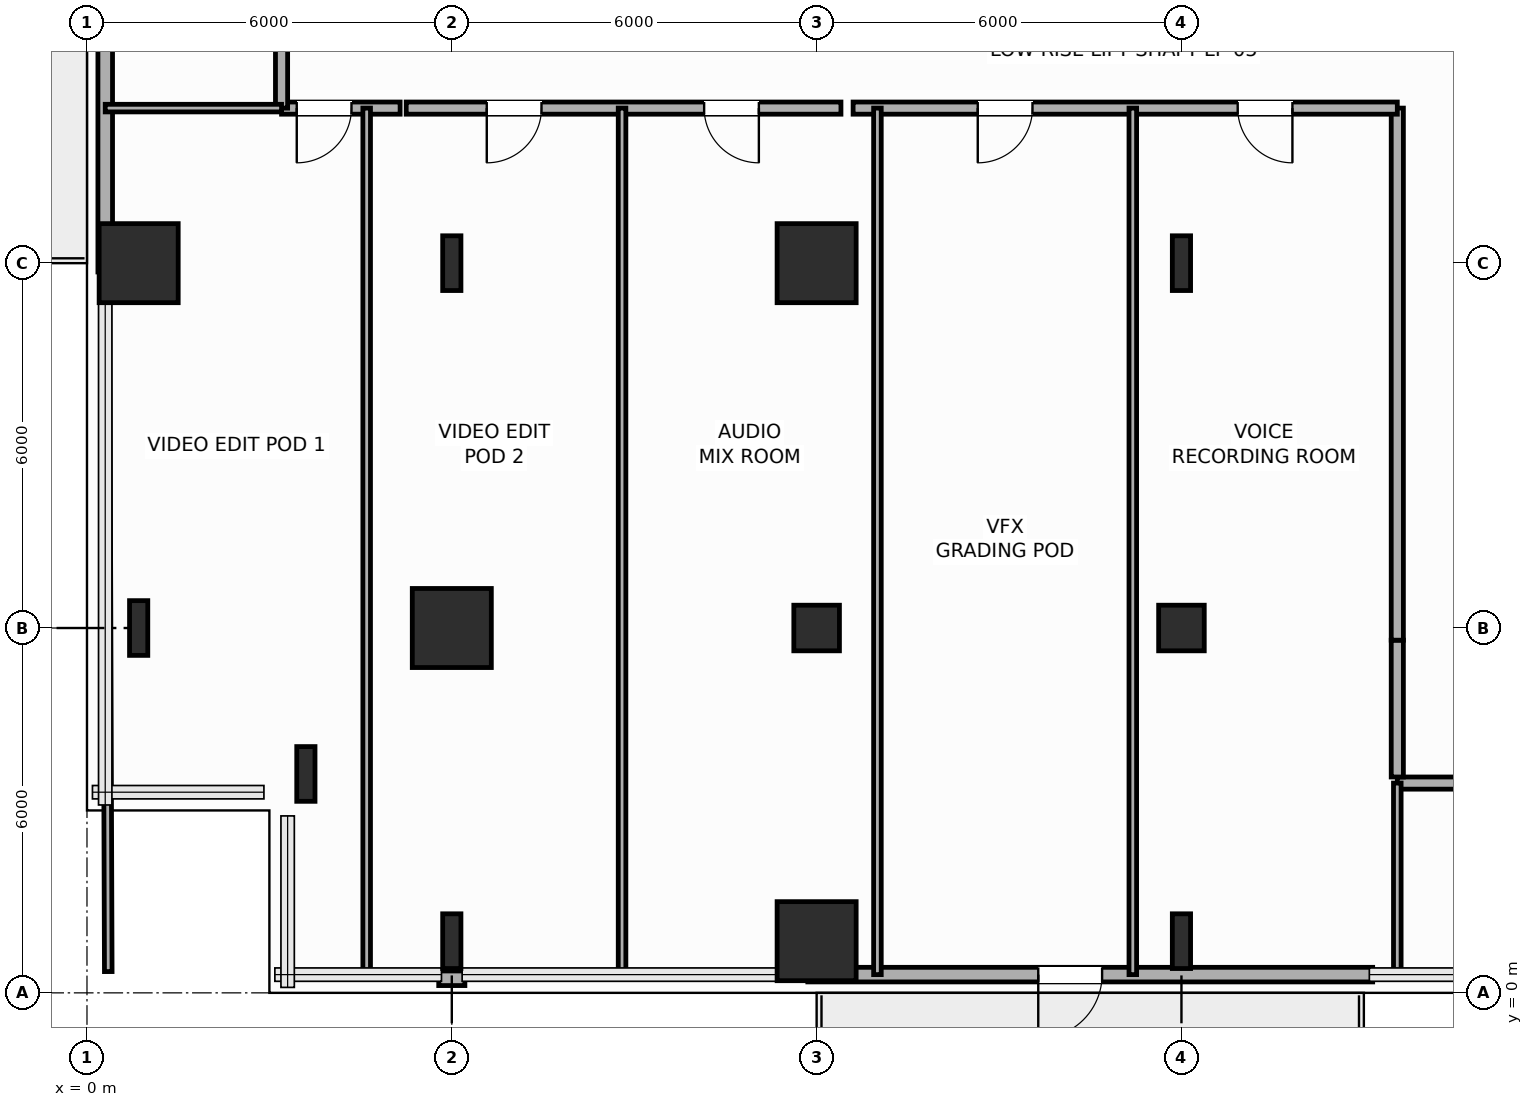
"""IFC4 building model, lengths in metres.
Left out: names, types, materials, properties, quantities, classifications, styles, units other than length and angle.
Written with IfcOpenShell. Run it as: python <this file> out.ifc"""

import sys

from ifc_helpers import new_model, si_unit, direction, frame, frame_2d, origin, origin_2d, place, context, subcontext, project, spatial, rectangle, hollow_rectangle, i_section, extrude, element, fill, save


model = new_model("IFC4")
c1 = context("Model", 3, precision=1e-05, world=origin(), true_north=direction((0.0, 1.0)))
c2 = subcontext(c1, "Body", "Model", "MODEL_VIEW")
j1 = project(units=[si_unit("LENGTHUNIT", "METRE"), si_unit("PLANEANGLEUNIT", "RADIAN")], contexts=[c1])
p1 = place(None, origin())
s1 = spatial("IfcSite", under=j1, at=p1, CompositionType="ELEMENT")
p2 = place(p1, origin())
s2 = spatial("IfcBuilding", under=s1, at=p2, CompositionType="ELEMENT")
p3 = place(p2, frame((0.0, 0.0, 48.0)))
s3 = spatial("IfcBuildingStorey", under=s2, at=p3, CompositionType="ELEMENT", Elevation=48.0)
for number, where, z_axis, x_axis in (
    (1, (3.6, 3.6, 0.0), (0.0, 0.0, 1.0), (1.0, 0.0, 0.0)),
    (2, (0.85, 6.0, 0.0), (0.0, 0.0, 1.0), (1.0, 0.0, 0.0)),
):
    element("IfcColumn", number, at=place(p3, frame(where, z_axis=z_axis, x_axis=x_axis)), inside=s3, PredefinedType="COLUMN", context=c2, shape_type="SweptSolid", body=[
        extrude(i_section(OverallWidth=0.3, OverallDepth=0.9, WebThickness=0.019, FlangeThickness=0.035, FilletRadius=0.03, at=origin_2d()), origin(), (0.0, 0.0, 1.0), 3.9),
    ])
p4 = place(p3, frame((0.85, 12.0, 0.0), z_axis=(0.0, 0.0, 1.0), x_axis=(1.0, 0.0, 0.0)))
e3 = element("IfcColumn", 3, at=p4, inside=s3, PredefinedType="COLUMN", context=c2, shape_type="SweptSolid", body=[
    extrude(rectangle(XDim=1.3, YDim=1.3, at=origin_2d()), origin(), (0.0, 0.0, 1.0), 3.9),
])
p5 = place(p3, frame((6.0, 0.85, 0.0), z_axis=(0.0, 0.0, 1.0), x_axis=(1.0, 0.0, 0.0)))
e4 = element("IfcColumn", 4, at=p5, inside=s3, PredefinedType="COLUMN", context=c2, shape_type="SweptSolid", body=[
    extrude(i_section(OverallWidth=0.3, OverallDepth=0.9, WebThickness=0.019, FlangeThickness=0.035, FilletRadius=0.03, at=origin_2d()), origin(), (0.0, 0.0, 1.0), 3.9),
])
p6 = place(p3, frame((6.0, 6.0, 0.0), z_axis=(0.0, 0.0, 1.0), x_axis=(1.0, 0.0, 0.0)))
e5 = element("IfcColumn", 5, at=p6, inside=s3, PredefinedType="COLUMN", context=c2, shape_type="SweptSolid", body=[
    extrude(rectangle(XDim=1.3, YDim=1.3, at=origin_2d()), origin(), (0.0, 0.0, 1.0), 3.9),
])
p7 = place(p3, frame((6.0, 12.0, 0.0), z_axis=(0.0, 0.0, 1.0), x_axis=(1.0, 0.0, 0.0)))
e6 = element("IfcColumn", 6, at=p7, inside=s3, PredefinedType="COLUMN", context=c2, shape_type="SweptSolid", body=[
    extrude(i_section(OverallWidth=0.3, OverallDepth=0.9, WebThickness=0.019, FlangeThickness=0.035, FilletRadius=0.03, at=origin_2d()), origin(), (0.0, 0.0, 1.0), 3.9),
])
p8 = place(p3, frame((12.0, 0.85, 0.0), z_axis=(0.0, 0.0, 1.0), x_axis=(1.0, 0.0, 0.0)))
e7 = element("IfcColumn", 7, at=p8, inside=s3, PredefinedType="COLUMN", context=c2, shape_type="SweptSolid", body=[
    extrude(rectangle(XDim=1.3, YDim=1.3, at=origin_2d()), origin(), (0.0, 0.0, 1.0), 3.9),
])
p9 = place(p3, frame((12.0, 6.0, 0.0), z_axis=(0.0, 0.0, 1.0), x_axis=(1.0, 0.0, 0.0)))
e8 = element("IfcColumn", 8, at=p9, inside=s3, PredefinedType="COLUMN", context=c2, shape_type="SweptSolid", body=[
    extrude(hollow_rectangle(XDim=0.75, YDim=0.75, WallThickness=0.035, InnerFilletRadius=0.035, OuterFilletRadius=0.05, at=origin_2d()), origin(), (0.0, 0.0, 1.0), 3.9),
])
p10 = place(p3, frame((12.0, 12.0, 0.0), z_axis=(0.0, 0.0, 1.0), x_axis=(1.0, 0.0, 0.0)))
e9 = element("IfcColumn", 9, at=p10, inside=s3, PredefinedType="COLUMN", context=c2, shape_type="SweptSolid", body=[
    extrude(rectangle(XDim=1.3, YDim=1.3, at=origin_2d()), origin(), (0.0, 0.0, 1.0), 3.9),
])
p11 = place(p3, frame((18.0, 0.85, 0.0), z_axis=(0.0, 0.0, 1.0), x_axis=(1.0, 0.0, 0.0)))
e10 = element("IfcColumn", 10, at=p11, inside=s3, PredefinedType="COLUMN", context=c2, shape_type="SweptSolid", body=[
    extrude(i_section(OverallWidth=0.3, OverallDepth=0.9, WebThickness=0.019, FlangeThickness=0.035, FilletRadius=0.03, at=origin_2d()), origin(), (0.0, 0.0, 1.0), 3.9),
])
p12 = place(p3, frame((18.0, 6.0, 0.0), z_axis=(0.0, 0.0, 1.0), x_axis=(1.0, 0.0, 0.0)))
e11 = element("IfcColumn", 11, at=p12, inside=s3, PredefinedType="COLUMN", context=c2, shape_type="SweptSolid", body=[
    extrude(hollow_rectangle(XDim=0.75, YDim=0.75, WallThickness=0.035, InnerFilletRadius=0.035, OuterFilletRadius=0.05, at=origin_2d()), origin(), (0.0, 0.0, 1.0), 3.9),
])
p13 = place(p3, frame((18.0, 12.0, 0.0), z_axis=(0.0, 0.0, 1.0), x_axis=(1.0, 0.0, 0.0)))
e12 = element("IfcColumn", 12, at=p13, inside=s3, PredefinedType="COLUMN", context=c2, shape_type="SweptSolid", body=[
    extrude(i_section(OverallWidth=0.3, OverallDepth=0.9, WebThickness=0.019, FlangeThickness=0.035, FilletRadius=0.03, at=origin_2d()), origin(), (0.0, 0.0, 1.0), 3.9),
])
p14 = place(p3, frame((21.145, 0.3, 0.0), z_axis=(0.0, 0.0, 1.0), x_axis=(-1.0, 0.0, 0.0)))
e13 = element("IfcWall", 13, at=p14, inside=s3, PredefinedType="SOLIDWALL", context=c2, shape_type="SweptSolid", body=[
    extrude(rectangle(XDim=9.29, YDim=0.24, at=frame_2d((4.645, 0.0))), origin(), (0.0, 0.0, 1.0), 3.65),
])
p15 = place(p14, frame((4.45, 0.0, 0.0)))
e14 = element("IfcOpeningElement", 14, at=p15, cuts=e13, PredefinedType="OPENING", context=c2, shape_type="SweptSolid", body=[
    extrude(rectangle(XDim=1.05, YDim=2.2, at=frame_2d((0.525, 1.1))), frame((0.0, 0.13, 0.0), z_axis=(0.0, -1.0, 0.0), x_axis=(1.0, 0.0, 0.0)), (0.0, 0.0, 1.0), 0.26),
])
p16 = place(p3, frame((0.3, 11.855, 0.0), z_axis=(0.0, 0.0, 1.0), x_axis=(0.0, 1.0, 0.0)))
e15 = element("IfcWall", 15, at=p16, inside=s3, PredefinedType="SOLIDWALL", context=c2, shape_type="SweptSolid", body=[
    extrude(rectangle(XDim=9.29, YDim=0.24, at=frame_2d((4.645, 0.0))), origin(), (0.0, 0.0, 1.0), 3.65),
])
p17 = place(p16, frame((3.945, 0.0, 0.0)))
e16 = element("IfcOpeningElement", 16, at=p17, cuts=e15, PredefinedType="OPENING", context=c2, shape_type="SweptSolid", body=[
    extrude(rectangle(XDim=1.05, YDim=2.2, at=frame_2d((0.525, 1.1))), frame((0.0, 0.13, 0.0), z_axis=(0.0, -1.0, 0.0), x_axis=(1.0, 0.0, 0.0)), (0.0, 0.0, 1.0), 0.26),
])
p18 = place(p3, frame((6.215, 0.24, 0.0), z_axis=(0.0, 0.0, 1.0), x_axis=(-1.0, 0.0, 0.0)))
e17 = element("IfcWall", 17, at=p18, inside=s3, PredefinedType="SOLIDWALL", context=c2, shape_type="SweptSolid", body=[
    extrude(rectangle(XDim=0.43, YDim=0.24, at=frame_2d((0.215, 0.0))), origin(), (0.0, 0.0, 1.0), 3.65),
])
p19 = place(p3, frame((36.15, 3.45, 0.0), z_axis=(0.0, 0.0, 1.0), x_axis=(-1.0, 0.0, 0.0)))
e18 = element("IfcWall", 18, at=p19, inside=s3, PredefinedType="PARTITIONING", context=c2, shape_type="SweptSolid", body=[
    extrude(rectangle(XDim=14.6, YDim=0.2, at=frame_2d((7.3, 0.0))), origin(), (0.0, 0.0, 1.0), 3.142),
])
p20 = place(p19, frame((11.325, 0.0, 0.0)))
e19 = element("IfcOpeningElement", 19, at=p20, cuts=e18, PredefinedType="OPENING", context=c2, shape_type="SweptSolid", body=[
    extrude(rectangle(XDim=0.9, YDim=2.1, at=frame_2d((0.45, 1.05))), frame((0.0, 0.11, 0.0), z_axis=(0.0, -1.0, 0.0), x_axis=(1.0, 0.0, 0.0)), (0.0, 0.0, 1.0), 0.22),
])
p21 = place(p19, frame((5.7, 0.0, 0.0)))
e20 = element("IfcOpeningElement", 20, at=p21, cuts=e18, PredefinedType="OPENING", context=c2, shape_type="SweptSolid", body=[
    extrude(rectangle(XDim=0.9, YDim=2.1, at=frame_2d((0.45, 1.05))), frame((0.0, 0.11, 0.0), z_axis=(0.0, -1.0, 0.0), x_axis=(1.0, 0.0, 0.0)), (0.0, 0.0, 1.0), 0.22),
])
p22 = place(p3, frame((21.55, 3.55, 0.0), z_axis=(0.0, 0.0, 1.0), x_axis=(0.0, 1.0, 0.0)))
e21 = element("IfcWall", 21, at=p22, inside=s3, PredefinedType="PARTITIONING", context=c2, shape_type="SweptSolid", body=[
    extrude(rectangle(XDim=2.25, YDim=0.2, at=frame_2d((1.125, 0.0))), origin(), (0.0, 0.0, 1.0), 3.65),
])
p23 = place(p3, frame((21.55, 5.8, 0.0), z_axis=(0.0, 0.0, 1.0), x_axis=(0.0, 1.0, 0.0)))
e22 = element("IfcWall", 22, at=p23, inside=s3, PredefinedType="PARTITIONING", context=c2, shape_type="SweptSolid", body=[
    extrude(rectangle(XDim=8.75, YDim=0.2, at=frame_2d((4.375, 0.0))), origin(), (0.0, 0.0, 1.0), 3.65),
])
p24 = place(p3, frame((21.55, 14.55, 0.0), z_axis=(0.0, 0.0, 1.0), x_axis=(-1.0, 0.0, 0.0)))
e23 = element("IfcWall", 23, at=p24, inside=s3, PredefinedType="PARTITIONING", context=c2, shape_type="SweptSolid", body=[
    extrude(rectangle(XDim=8.95, YDim=0.2, at=frame_2d((4.475, 0.0))), origin(), (0.0, 0.0, 1.0), 3.65),
])
p25 = place(p24, frame((6.0, 0.0, 0.0)))
e24 = element("IfcOpeningElement", 24, at=p25, cuts=e23, PredefinedType="OPENING", context=c2, shape_type="SweptSolid", body=[
    extrude(rectangle(XDim=0.9, YDim=2.1, at=frame_2d((0.45, 1.05))), frame((0.0, 0.11, 0.0), z_axis=(0.0, -1.0, 0.0), x_axis=(1.0, 0.0, 0.0)), (0.0, 0.0, 1.0), 0.22),
])
p26 = place(p24, frame((1.725, 0.0, 0.0)))
e25 = element("IfcOpeningElement", 25, at=p26, cuts=e23, PredefinedType="OPENING", context=c2, shape_type="SweptSolid", body=[
    extrude(rectangle(XDim=0.9, YDim=2.1, at=frame_2d((0.45, 1.05))), frame((0.0, 0.11, 0.0), z_axis=(0.0, -1.0, 0.0), x_axis=(1.0, 0.0, 0.0)), (0.0, 0.0, 1.0), 0.22),
])
p27 = place(p3, frame((12.4, 14.55, 0.0), z_axis=(0.0, 0.0, 1.0), x_axis=(-1.0, 0.0, 0.0)))
e26 = element("IfcWall", 26, at=p27, inside=s3, PredefinedType="PARTITIONING", context=c2, shape_type="SweptSolid", body=[
    extrude(rectangle(XDim=7.15, YDim=0.2, at=frame_2d((3.575, 0.0))), origin(), (0.0, 0.0, 1.0), 3.65),
])
p28 = place(p27, frame((4.925, 0.0, 0.0)))
e27 = element("IfcOpeningElement", 27, at=p28, cuts=e26, PredefinedType="OPENING", context=c2, shape_type="SweptSolid", body=[
    extrude(rectangle(XDim=0.9, YDim=2.1, at=frame_2d((0.45, 1.05))), frame((0.0, 0.11, 0.0), z_axis=(0.0, -1.0, 0.0), x_axis=(1.0, 0.0, 0.0)), (0.0, 0.0, 1.0), 0.22),
])
p29 = place(p27, frame((1.35, 0.0, 0.0)))
e28 = element("IfcOpeningElement", 28, at=p29, cuts=e26, PredefinedType="OPENING", context=c2, shape_type="SweptSolid", body=[
    extrude(rectangle(XDim=0.9, YDim=2.1, at=frame_2d((0.45, 1.05))), frame((0.0, 0.11, 0.0), z_axis=(0.0, -1.0, 0.0), x_axis=(1.0, 0.0, 0.0)), (0.0, 0.0, 1.0), 0.22),
])
p30 = place(p3, frame((5.15, 14.55, 0.0), z_axis=(0.0, 0.0, 1.0), x_axis=(-1.0, 0.0, 0.0)))
e29 = element("IfcWall", 29, at=p30, inside=s3, PredefinedType="PARTITIONING", context=c2, shape_type="SweptSolid", body=[
    extrude(rectangle(XDim=1.95, YDim=0.2, at=frame_2d((0.975, 0.0))), origin(), (0.0, 0.0, 1.0), 3.65),
])
p31 = place(p30, frame((0.8, 0.0, 0.0)))
e30 = element("IfcOpeningElement", 30, at=p31, cuts=e29, PredefinedType="OPENING", context=c2, shape_type="SweptSolid", body=[
    extrude(rectangle(XDim=0.9, YDim=2.1, at=frame_2d((0.45, 1.05))), frame((0.0, 0.11, 0.0), z_axis=(0.0, -1.0, 0.0), x_axis=(1.0, 0.0, 0.0)), (0.0, 0.0, 1.0), 0.22),
])
p32 = place(p3, frame((3.2, 14.55, 0.0), z_axis=(0.0, 0.0, 1.0), x_axis=(0.0, 1.0, 0.0)))
e31 = element("IfcWall", 31, at=p32, inside=s3, PredefinedType="PARTITIONING", context=c2, shape_type="SweptSolid", body=[
    extrude(rectangle(XDim=15.7, YDim=0.2, at=frame_2d((7.85, 0.0))), origin(), (0.0, 0.0, 1.0), 3.65),
])
p33 = place(p32, frame((2.65, 0.0, 0.0)))
e32 = element("IfcOpeningElement", 32, at=p33, cuts=e31, PredefinedType="OPENING", context=c2, shape_type="SweptSolid", body=[
    extrude(rectangle(XDim=0.9, YDim=2.1, at=frame_2d((0.45, 1.05))), frame((0.0, 0.11, 0.0), z_axis=(0.0, -1.0, 0.0), x_axis=(1.0, 0.0, 0.0)), (0.0, 0.0, 1.0), 0.22),
])
p34 = place(p32, frame((8.85, 0.0, 0.0)))
e33 = element("IfcOpeningElement", 33, at=p34, cuts=e31, PredefinedType="OPENING", context=c2, shape_type="SweptSolid", body=[
    extrude(rectangle(XDim=0.9, YDim=2.1, at=frame_2d((0.45, 1.05))), frame((0.0, 0.11, 0.0), z_axis=(0.0, -1.0, 0.0), x_axis=(1.0, 0.0, 0.0)), (0.0, 0.0, 1.0), 0.22),
])
p35 = place(p32, frame((13.6, 0.0, 0.0)))
e34 = element("IfcOpeningElement", 34, at=p35, cuts=e31, PredefinedType="OPENING", context=c2, shape_type="SweptSolid", body=[
    extrude(rectangle(XDim=0.9, YDim=2.1, at=frame_2d((0.45, 1.05))), frame((0.0, 0.11, 0.0), z_axis=(0.0, -1.0, 0.0), x_axis=(1.0, 0.0, 0.0)), (0.0, 0.0, 1.0), 0.22),
])
p36 = place(p3, frame((0.35, 0.35, 0.0), z_axis=(0.0, 0.0, 1.0), x_axis=(-0.003522599314, 0.999993795628, 0.0)))
e35 = element("IfcWall", 35, at=p36, inside=s3, PredefinedType="PARTITIONING", context=c2, shape_type="SweptSolid", body=[
    extrude(rectangle(XDim=11.505, YDim=0.125, at=frame_2d((5.752, 0.0))), origin(), (0.0, 0.0, 1.0), 3.65),
])
for number, where, z_axis, x_axis in (
    (36, (4.6, 0.3, 0.0), (0.0, 0.0, 1.0), (0.0, 1.0, 0.0)),
    (37, (8.8, 0.3, 0.0), (0.0, 0.0, 1.0), (0.0, 1.0, 0.0)),
    (38, (13.0, 0.3, 0.0), (0.0, 0.0, 1.0), (0.0, 1.0, 0.0)),
    (39, (17.2, 0.3, 0.0), (0.0, 0.0, 1.0), (0.0, 1.0, 0.0)),
):
    element("IfcWall", number, at=place(p3, frame(where, z_axis=z_axis, x_axis=x_axis)), inside=s3, PredefinedType="PARTITIONING", context=c2, shape_type="SweptSolid", body=[
        extrude(rectangle(XDim=14.25, YDim=0.125, at=frame_2d((7.125, 0.0))), origin(), (0.0, 0.0, 1.0), 3.65),
    ])
p37 = place(p3, frame((0.3, 14.55, 0.0), z_axis=(0.0, 0.0, 1.0), x_axis=(1.0, 0.0, 0.0)))
e40 = element("IfcWall", 40, at=p37, inside=s3, PredefinedType="PARTITIONING", context=c2, shape_type="SweptSolid", body=[
    extrude(rectangle(XDim=2.9, YDim=0.125, at=frame_2d((1.45, 0.0))), origin(), (0.0, 0.0, 1.0), 3.65),
])
p38 = place(p3, frame((21.55, 0.3, 0.0), z_axis=(0.0, 0.0, 1.0), x_axis=(0.0, 1.0, 0.0)))
e41 = element("IfcWall", 41, at=p38, inside=s3, PredefinedType="PARTITIONING", context=c2, shape_type="SweptSolid", body=[
    extrude(rectangle(XDim=3.15, YDim=0.125, at=frame_2d((1.575, 0.0))), origin(), (0.0, 0.0, 1.0), 3.65),
])
p39 = place(p15, origin())
e42 = element("IfcDoor", 42, at=p39, inside=s3, OperationType="SINGLE_SWING_RIGHT", PredefinedType="DOOR", context=c2, shape_type="SweptSolid", body=[
    extrude(rectangle(XDim=1.05, YDim=2.2, at=frame_2d((0.525, 1.1))), frame((0.0, 0.025, 0.0), z_axis=(0.0, -1.0, 0.0), x_axis=(1.0, 0.0, 0.0)), (0.0, 0.0, 1.0), 0.05),
])
fill(e14, e42)
p40 = place(p25, origin())
e43 = element("IfcDoor", 43, at=p40, inside=s3, OperationType="SINGLE_SWING_RIGHT", PredefinedType="DOOR", context=c2, shape_type="SweptSolid", body=[
    extrude(rectangle(XDim=0.9, YDim=2.1, at=frame_2d((0.45, 1.05))), frame((0.0, 0.025, 0.0), z_axis=(0.0, -1.0, 0.0), x_axis=(1.0, 0.0, 0.0)), (0.0, 0.0, 1.0), 0.05),
])
fill(e24, e43)
p41 = place(p26, origin())
e44 = element("IfcDoor", 44, at=p41, inside=s3, OperationType="SINGLE_SWING_LEFT", PredefinedType="DOOR", context=c2, shape_type="SweptSolid", body=[
    extrude(rectangle(XDim=0.9, YDim=2.1, at=frame_2d((0.45, 1.05))), frame((0.0, 0.025, 0.0), z_axis=(0.0, -1.0, 0.0), x_axis=(1.0, 0.0, 0.0)), (0.0, 0.0, 1.0), 0.05),
])
fill(e25, e44)
p42 = place(p28, origin())
e45 = element("IfcDoor", 45, at=p42, inside=s3, OperationType="SINGLE_SWING_RIGHT", PredefinedType="DOOR", context=c2, shape_type="SweptSolid", body=[
    extrude(rectangle(XDim=0.9, YDim=2.1, at=frame_2d((0.45, 1.05))), frame((0.0, 0.025, 0.0), z_axis=(0.0, -1.0, 0.0), x_axis=(1.0, 0.0, 0.0)), (0.0, 0.0, 1.0), 0.05),
])
fill(e27, e45)
p43 = place(p29, origin())
e46 = element("IfcDoor", 46, at=p43, inside=s3, OperationType="SINGLE_SWING_LEFT", PredefinedType="DOOR", context=c2, shape_type="SweptSolid", body=[
    extrude(rectangle(XDim=0.9, YDim=2.1, at=frame_2d((0.45, 1.05))), frame((0.0, 0.025, 0.0), z_axis=(0.0, -1.0, 0.0), x_axis=(1.0, 0.0, 0.0)), (0.0, 0.0, 1.0), 0.05),
])
fill(e28, e46)
p44 = place(p31, origin())
e47 = element("IfcDoor", 47, at=p44, inside=s3, OperationType="SINGLE_SWING_RIGHT", PredefinedType="DOOR", context=c2, shape_type="SweptSolid", body=[
    extrude(rectangle(XDim=0.9, YDim=2.1, at=frame_2d((0.45, 1.05))), frame((0.0, 0.025, 0.0), z_axis=(0.0, -1.0, 0.0), x_axis=(1.0, 0.0, 0.0)), (0.0, 0.0, 1.0), 0.05),
])
fill(e30, e47)
save(model, sys.argv[1])
